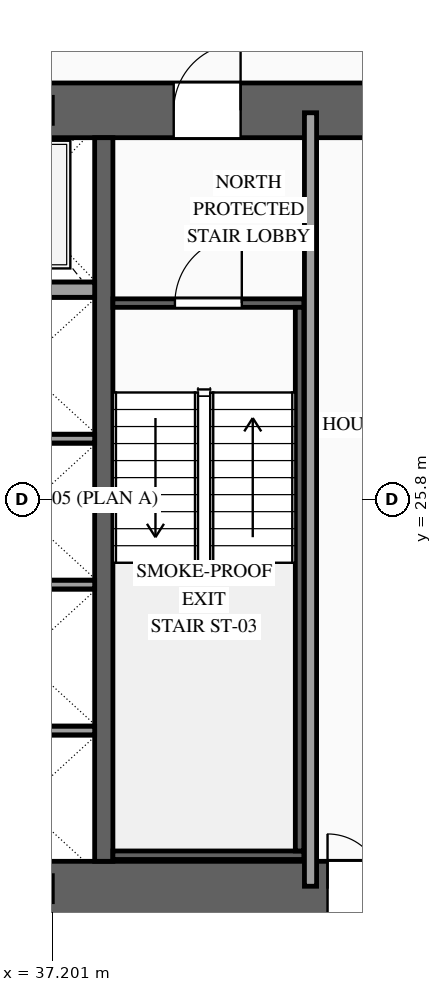
"""IFC4 building model, lengths in metres.
Left out: names, types, materials, properties, quantities, classifications, styles, units other than length and angle.
Written with IfcOpenShell. Run it as: python <this file> out.ifc"""

import sys

from ifc_helpers import new_model, si_unit, direction, frame, frame_2d, origin, origin_2d, place, context, subcontext, project, spatial, rectangle, i_section, extrude, source, transform, mapped, element, fill, save


model = new_model("IFC4")
c1 = context("Model", 3, precision=1e-05, world=origin(), true_north=direction((0.0, 1.0)))
c2 = subcontext(c1, "Body", "Model", "MODEL_VIEW")
j1 = project(units=[si_unit("LENGTHUNIT", "METRE"), si_unit("PLANEANGLEUNIT", "RADIAN")], contexts=[c1])
p1 = place(None, origin())
s1 = spatial("IfcSite", under=j1, at=p1, CompositionType="ELEMENT")
p2 = place(p1, origin())
s2 = spatial("IfcBuilding", under=s1, at=p2, CompositionType="ELEMENT")
p3 = place(p2, frame((0.0, 0.0, 34.2)))
s3 = spatial("IfcBuildingStorey", under=s2, at=p3, CompositionType="ELEMENT", Elevation=34.2)
p4 = place(p3, frame((23.35, 19.4, 0.0), z_axis=(0.0, 0.0, 1.0), x_axis=(1.0, 0.0, 0.0)))
e1 = element("IfcWall", 1, at=p4, inside=s3, PredefinedType="SHEAR", context=c2, shape_type="SweptSolid", body=[
    extrude(rectangle(XDim=27.3, YDim=0.9, at=frame_2d((13.65, 0.0))), origin(), (0.0, 0.0, 1.0), 3.6),
])
p5 = place(p4, frame((2.1, 0.0, 0.0)))
e2 = element("IfcOpeningElement", 2, at=p5, cuts=e1, PredefinedType="OPENING", context=c2, shape_type="SweptSolid", body=[
    extrude(rectangle(XDim=1.1, YDim=2.2, at=frame_2d((0.55, 1.1))), frame((0.0, 0.465, 0.0), z_axis=(0.0, -1.0, 0.0), x_axis=(1.0, 0.0, 0.0)), (0.0, 0.0, 1.0), 0.93),
])
p6 = place(p4, frame((10.0, 0.0, 0.0)))
e3 = element("IfcOpeningElement", 3, at=p6, cuts=e1, PredefinedType="OPENING", context=c2, shape_type="SweptSolid", body=[
    extrude(rectangle(XDim=1.1, YDim=2.2, at=frame_2d((0.55, 1.1))), frame((0.0, 0.465, 0.0), z_axis=(0.0, -1.0, 0.0), x_axis=(1.0, 0.0, 0.0)), (0.0, 0.0, 1.0), 0.93),
])
p7 = place(p4, frame((23.2, 0.0, 0.0)))
e4 = element("IfcOpeningElement", 4, at=p7, cuts=e1, PredefinedType="OPENING", context=c2, shape_type="SweptSolid", body=[
    extrude(rectangle(XDim=1.1, YDim=2.2, at=frame_2d((0.55, 1.1))), frame((0.0, 0.465, 0.0), z_axis=(0.0, -1.0, 0.0), x_axis=(1.0, 0.0, 0.0)), (0.0, 0.0, 1.0), 0.93),
])
p8 = place(p4, frame((19.82, 0.0, 0.0)))
e5 = element("IfcOpeningElement", 5, at=p8, cuts=e1, PredefinedType="OPENING", context=c2, shape_type="SweptSolid", body=[
    extrude(rectangle(XDim=0.9, YDim=2.15, at=frame_2d((0.45, 1.075))), frame((0.0, 0.465, 0.0), z_axis=(0.0, -1.0, 0.0), x_axis=(1.0, 0.0, 0.0)), (0.0, 0.0, 1.0), 0.93),
])
p9 = place(p4, frame((18.38, 0.0, 0.0)))
e6 = element("IfcOpeningElement", 6, at=p9, cuts=e1, PredefinedType="OPENING", context=c2, shape_type="SweptSolid", body=[
    extrude(rectangle(XDim=0.9, YDim=2.15, at=frame_2d((0.45, 1.075))), frame((0.0, 0.465, 0.0), z_axis=(0.0, -1.0, 0.0), x_axis=(1.0, 0.0, 0.0)), (0.0, 0.0, 1.0), 0.93),
])
p10 = place(p3, frame((23.35, 32.2, 0.0), z_axis=(0.0, 0.0, 1.0), x_axis=(1.0, 0.0, 0.0)))
e7 = element("IfcWall", 7, at=p10, inside=s3, PredefinedType="SHEAR", context=c2, shape_type="SweptSolid", body=[
    extrude(rectangle(XDim=27.3, YDim=0.9, at=frame_2d((13.65, 0.0))), origin(), (0.0, 0.0, 1.0), 3.6),
])
p11 = place(p10, frame((4.72, 0.0, 0.0)))
e8 = element("IfcOpeningElement", 8, at=p11, cuts=e7, PredefinedType="OPENING", context=c2, shape_type="SweptSolid", body=[
    extrude(rectangle(XDim=0.9, YDim=2.15, at=frame_2d((0.45, 1.075))), frame((0.0, 0.465, 0.0), z_axis=(0.0, -1.0, 0.0), x_axis=(1.0, 0.0, 0.0)), (0.0, 0.0, 1.0), 0.93),
])
p12 = place(p10, frame((10.0, 0.0, 0.0)))
e9 = element("IfcOpeningElement", 9, at=p12, cuts=e7, PredefinedType="OPENING", context=c2, shape_type="SweptSolid", body=[
    extrude(rectangle(XDim=1.1, YDim=2.2, at=frame_2d((0.55, 1.1))), frame((0.0, 0.465, 0.0), z_axis=(0.0, -1.0, 0.0), x_axis=(1.0, 0.0, 0.0)), (0.0, 0.0, 1.0), 0.93),
])
p13 = place(p10, frame((15.85, 0.0, 0.0)))
e10 = element("IfcOpeningElement", 10, at=p13, cuts=e7, PredefinedType="OPENING", context=c2, shape_type="SweptSolid", body=[
    extrude(rectangle(XDim=1.1, YDim=2.2, at=frame_2d((0.55, 1.1))), frame((0.0, 0.465, 0.0), z_axis=(0.0, -1.0, 0.0), x_axis=(1.0, 0.0, 0.0)), (0.0, 0.0, 1.0), 0.93),
])
m1 = source(origin(), c2, "Body", "SweptSolid", [
    extrude(rectangle(XDim=11.9, YDim=0.3, at=frame_2d((5.95, 0.0))), origin(), (0.0, 0.0, 1.0), 3.6),
])
p14 = place(p3, frame((38.05, 19.85, 0.0), z_axis=(0.0, 0.0, 1.0), x_axis=(0.0, 1.0, 0.0)))
e11 = element("IfcWall", 11, at=p14, inside=s3, PredefinedType="SOLIDWALL", context=c2, shape_type="MappedRepresentation", body=[
    mapped(m1, transform((0.0, 0.0, 0.0), scale=1.0)),
])
m2 = source(origin(), c2, "Body", "SweptSolid", [
    extrude(i_section(OverallWidth=0.407, OverallDepth=0.428, WebThickness=0.02, FlangeThickness=0.035, at=origin_2d()), origin(), (0.0, 0.0, 1.0), 3.6),
])
for number, where, z_axis, x_axis in (
    (12, (37.0, 19.4, 0.0), (0.0, 0.0, 1.0), (1.0, 0.0, 0.0)),
    (13, (37.0, 32.2, 0.0), (0.0, 0.0, 1.0), (1.0, 0.0, 0.0)),
):
    element("IfcColumn", number, at=place(p3, frame(where, z_axis=z_axis, x_axis=x_axis)), inside=s3, PredefinedType="COLUMN", context=c2, shape_type="MappedRepresentation", body=[
        mapped(m2, transform((0.0, 0.0, 0.0), scale=1.0)),
    ])
m3 = source(origin(), c2, "Body", "SweptSolid", [
    extrude(rectangle(XDim=2.4, YDim=0.14, at=frame_2d((1.2, 0.0))), origin(), (0.0, 0.0, 1.0), 3.38),
])
for number, where, z_axis, x_axis in (
    (14, (35.5, 22.0, 0.0), (0.0, 0.0, 1.0), (1.0, 0.0, 0.0)),
    (15, (35.5, 24.4, 0.0), (0.0, 0.0, 1.0), (1.0, 0.0, 0.0)),
    (16, (35.5, 26.8, 0.0), (0.0, 0.0, 1.0), (1.0, 0.0, 0.0)),
):
    element("IfcWall", number, at=place(p3, frame(where, z_axis=z_axis, x_axis=x_axis)), inside=s3, PredefinedType="SOLIDWALL", context=c2, shape_type="MappedRepresentation", body=[
        mapped(m3, transform((0.0, 0.0, 0.0), scale=1.0)),
    ])
m4 = source(origin(), c2, "Body", "SweptSolid", [
    extrude(rectangle(XDim=2.4, YDim=0.25, at=frame_2d((1.2, 0.0))), origin(), (0.0, 0.0, 1.0), 3.38),
])
p15 = place(p3, frame((35.5, 29.25, 0.0), z_axis=(0.0, 0.0, 1.0), x_axis=(1.0, 0.0, 0.0)))
e17 = element("IfcWall", 17, at=p15, inside=s3, PredefinedType="SOLIDWALL", context=c2, shape_type="MappedRepresentation", body=[
    mapped(m4, transform((0.0, 0.0, 0.0), scale=1.0)),
])
p16 = place(p3, frame((38.2, 29.03, 0.0), z_axis=(0.0, 0.0, 1.0), x_axis=(1.0, 0.0, 0.0)))
e18 = element("IfcWall", 18, at=p16, inside=s3, PredefinedType="SOLIDWALL", context=c2, shape_type="SweptSolid", body=[
    extrude(rectangle(XDim=3.14, YDim=0.14, at=frame_2d((1.57, 0.0))), origin(), (0.0, 0.0, 1.0), 3.38),
])
p17 = place(p16, frame((1.02, 0.0, 0.0)))
e19 = element("IfcOpeningElement", 19, at=p17, cuts=e18, PredefinedType="OPENING", context=c2, shape_type="SweptSolid", body=[
    extrude(rectangle(XDim=1.1, YDim=2.2, at=frame_2d((0.55, 1.1))), frame((0.0, 0.085, 0.0), z_axis=(0.0, -1.0, 0.0), x_axis=(1.0, 0.0, 0.0)), (0.0, 0.0, 1.0), 0.17),
])
m5 = source(origin(), c2, "Body", "SweptSolid", [
    extrude(rectangle(XDim=3.14, YDim=0.14, at=frame_2d((1.57, 0.0))), origin(), (0.0, 0.0, 1.0), 3.38),
])
p18 = place(p3, frame((38.2, 19.95, 0.0), z_axis=(0.0, 0.0, 1.0), x_axis=(1.0, 0.0, 0.0)))
e20 = element("IfcWall", 20, at=p18, inside=s3, PredefinedType="SOLIDWALL", context=c2, shape_type="MappedRepresentation", body=[
    mapped(m5, transform((0.0, 0.0, 0.0), scale=1.0)),
])
m6 = source(origin(), c2, "Body", "SweptSolid", [
    extrude(rectangle(XDim=8.94, YDim=0.14, at=frame_2d((4.47, 0.0))), origin(), (0.0, 0.0, 1.0), 3.38),
])
p19 = place(p3, frame((41.27, 20.02, 0.0), z_axis=(0.0, 0.0, 1.0), x_axis=(0.0, 1.0, 0.0)))
e21 = element("IfcWall", 21, at=p19, inside=s3, PredefinedType="SOLIDWALL", context=c2, shape_type="MappedRepresentation", body=[
    mapped(m6, transform((0.0, 0.0, 0.0), scale=1.0)),
])
m7 = source(origin(), c2, "Body", "SweptSolid", [
    extrude(rectangle(XDim=12.72, YDim=0.2, at=frame_2d((6.36, 0.0))), origin(), (0.0, 0.0, 1.0), 3.38),
])
p20 = place(p3, frame((41.45, 19.44, 0.0), z_axis=(0.0, 0.0, 1.0), x_axis=(0.0, 1.0, 0.0)))
e22 = element("IfcWall", 22, at=p20, inside=s3, PredefinedType="PARTITIONING", context=c2, shape_type="MappedRepresentation", body=[
    mapped(m7, transform((0.0, 0.0, 0.0), scale=1.0)),
])
m8 = source(origin(), c2, "Body", "SweptSolid", [
    extrude(rectangle(XDim=1.1, YDim=2.2, at=frame_2d((0.55, 1.1))), frame((0.0, 0.025, 0.0), z_axis=(0.0, -1.0, 0.0), x_axis=(1.0, 0.0, 0.0)), (0.0, 0.0, 1.0), 0.05),
])
p21 = place(p17, origin())
e23 = element("IfcDoor", 23, at=p21, inside=s3, OperationType="SINGLE_SWING_RIGHT", PredefinedType="DOOR", context=c2, shape_type="MappedRepresentation", body=[
    mapped(m8, transform((0.0, 0.0, 0.0), scale=1.0)),
])
fill(e19, e23)
p22 = place(p13, origin())
e24 = element("IfcDoor", 24, at=p22, inside=s3, OperationType="SINGLE_SWING_RIGHT", PredefinedType="DOOR", context=c2, shape_type="MappedRepresentation", body=[
    mapped(m8, transform((0.0, 0.0, 0.0), scale=1.0)),
])
fill(e10, e24)
m9 = source(origin(), c2, "Body", "SweptSolid", [
    extrude(rectangle(XDim=0.9, YDim=2.15, at=frame_2d((0.45, 1.075))), frame((0.0, 0.025, 0.0), z_axis=(0.0, -1.0, 0.0), x_axis=(1.0, 0.0, 0.0)), (0.0, 0.0, 1.0), 0.05),
])
p23 = place(p9, origin())
e25 = element("IfcDoor", 25, at=p23, inside=s3, OperationType="SINGLE_SWING_LEFT", PredefinedType="DOOR", context=c2, shape_type="MappedRepresentation", body=[
    mapped(m9, transform((0.0, 0.0, 0.0), scale=1.0)),
])
fill(e6, e25)
save(model, sys.argv[1])
